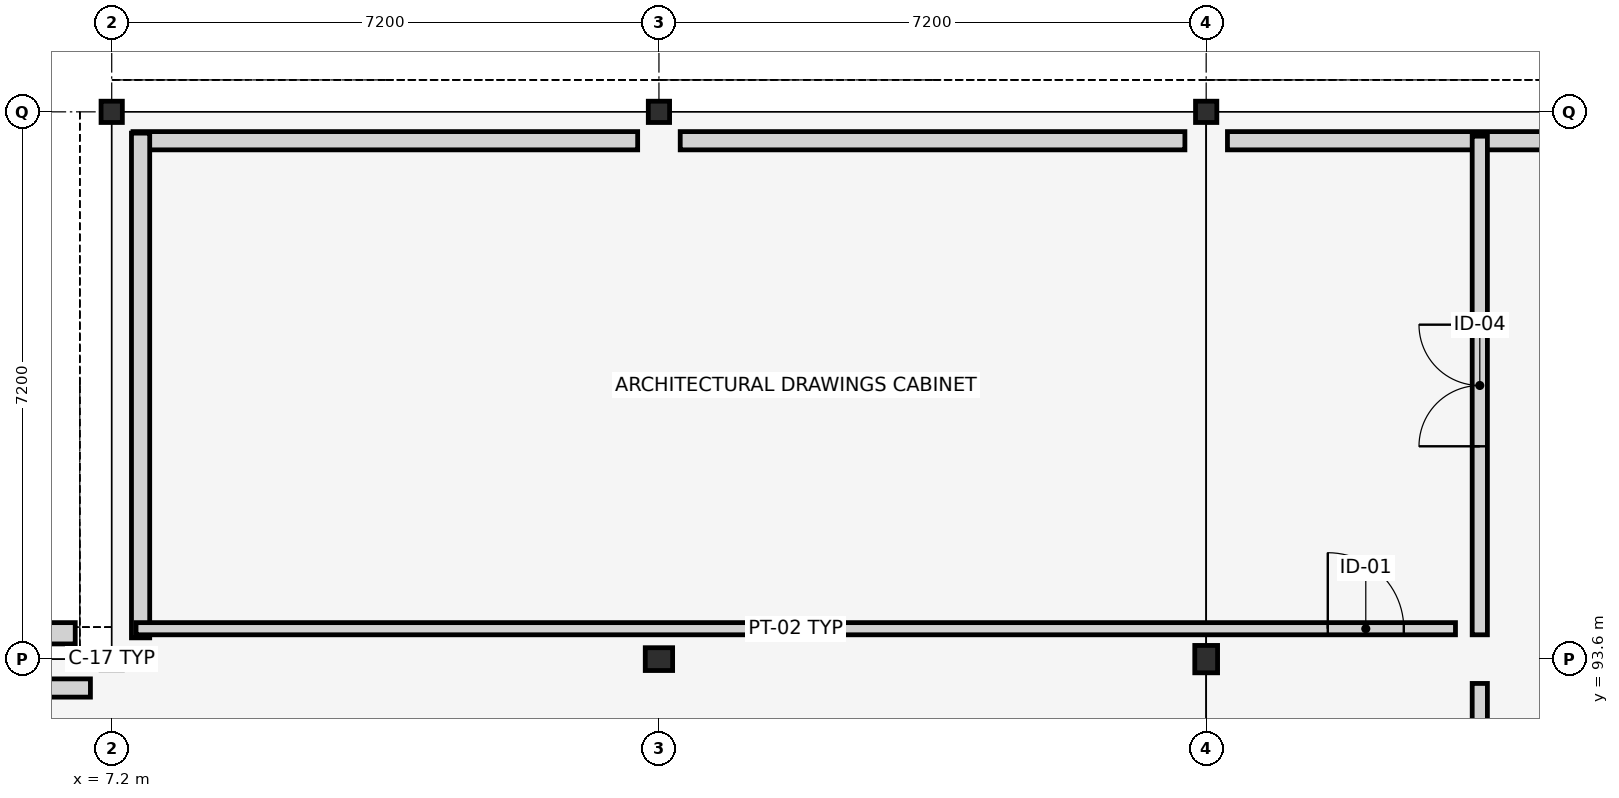
"""IFC4 building model, lengths in metres.
Left out: names, types, materials, properties, quantities, classifications, styles, units other than length and angle.
Written with IfcOpenShell. Run it as: python <this file> out.ifc"""

import sys

from ifc_helpers import new_model, si_unit, direction, frame, frame_2d, origin, origin_2d, place, context, subcontext, project, spatial, rectangle, i_section, extrude, element, fill, save


model = new_model("IFC4")
c1 = context("Model", 3, precision=1e-05, world=origin(), true_north=direction((0.0, 1.0)))
c2 = subcontext(c1, "Body", "Model", "MODEL_VIEW")
j1 = project(units=[si_unit("LENGTHUNIT", "METRE"), si_unit("PLANEANGLEUNIT", "RADIAN")], contexts=[c1])
p1 = place(None, origin())
s1 = spatial("IfcSite", under=j1, at=p1, CompositionType="ELEMENT")
p2 = place(p1, origin())
s2 = spatial("IfcBuilding", under=s1, at=p2, CompositionType="ELEMENT")
p3 = place(p2, frame((0.0, 0.0, 12.9)))
s3 = spatial("IfcBuildingStorey", under=s2, at=p3, CompositionType="ELEMENT", Elevation=12.9)
for number, where, z_axis, x_axis in (
    (1, (7.2, 93.6, 0.0), (0.0, 0.0, 1.0), (1.0, 0.0, 0.0)),
    (2, (7.2, 100.8, 0.0), (0.0, 0.0, 1.0), (0.0, 1.0, 0.0)),
):
    element("IfcColumn", number, at=place(p3, frame(where, z_axis=z_axis, x_axis=x_axis)), inside=s3, PredefinedType="COLUMN", context=c2, shape_type="SweptSolid", body=[
        extrude(i_section(OverallWidth=0.28, OverallDepth=0.28, WebThickness=0.01, FlangeThickness=0.018, FilletRadius=0.024, at=origin_2d()), origin(), (0.0, 0.0, 1.0), 4.2),
    ])
p4 = place(p3, frame((14.4, 93.6, 0.0), z_axis=(0.0, 0.0, 1.0), x_axis=(0.0, 1.0, 0.0)))
e3 = element("IfcColumn", 3, at=p4, inside=s3, PredefinedType="COLUMN", context=c2, shape_type="SweptSolid", body=[
    extrude(i_section(OverallWidth=0.3, OverallDepth=0.36, WebThickness=0.012, FlangeThickness=0.022, FilletRadius=0.027, at=origin_2d()), origin(), (0.0, 0.0, 1.0), 4.2),
])
p5 = place(p3, frame((14.4, 100.8, 0.0), z_axis=(0.0, 0.0, 1.0), x_axis=(1.0, 0.0, 0.0)))
e4 = element("IfcColumn", 4, at=p5, inside=s3, PredefinedType="COLUMN", context=c2, shape_type="SweptSolid", body=[
    extrude(i_section(OverallWidth=0.28, OverallDepth=0.28, WebThickness=0.01, FlangeThickness=0.018, FilletRadius=0.024, at=origin_2d()), origin(), (0.0, 0.0, 1.0), 4.2),
])
p6 = place(p3, frame((21.6, 93.6, 0.0), z_axis=(0.0, 0.0, 1.0), x_axis=(1.0, 0.0, 0.0)))
e5 = element("IfcColumn", 5, at=p6, inside=s3, PredefinedType="COLUMN", context=c2, shape_type="SweptSolid", body=[
    extrude(i_section(OverallWidth=0.3, OverallDepth=0.36, WebThickness=0.012, FlangeThickness=0.022, FilletRadius=0.027, at=origin_2d()), origin(), (0.0, 0.0, 1.0), 4.2),
])
p7 = place(p3, frame((21.6, 100.8, 0.0), z_axis=(0.0, 0.0, 1.0), x_axis=(0.0, 1.0, 0.0)))
e6 = element("IfcColumn", 6, at=p7, inside=s3, PredefinedType="COLUMN", context=c2, shape_type="SweptSolid", body=[
    extrude(i_section(OverallWidth=0.28, OverallDepth=0.28, WebThickness=0.01, FlangeThickness=0.018, FilletRadius=0.024, at=origin_2d()), origin(), (0.0, 0.0, 1.0), 4.2),
])
for number, where, z_axis, x_axis in (
    (7, (14.12, 100.42, 0.0), (0.0, 0.0, 1.0), (-1.0, 0.0, 0.0)),
    (8, (21.32, 100.42, 0.0), (0.0, 0.0, 1.0), (-1.0, 0.0, 0.0)),
    (9, (28.52, 100.42, 0.0), (0.0, 0.0, 1.0), (-1.0, 0.0, 0.0)),
    (10, (7.58, 100.52, 0.0), (0.0, 0.0, 1.0), (0.0, -1.0, 0.0)),
):
    element("IfcWall", number, at=place(p3, frame(where, z_axis=z_axis, x_axis=x_axis)), inside=s3, PredefinedType="STANDARD", context=c2, shape_type="SweptSolid", body=[
        extrude(rectangle(XDim=6.64, YDim=0.24, at=frame_2d((3.32, 0.0))), origin(), (0.0, 0.0, 1.0), 3.58),
    ])
p8 = place(p3, frame((6.72, 93.94, 0.0), z_axis=(0.0, 0.0, 1.0), x_axis=(-1.0, 0.0, 0.0)))
e11 = element("IfcWall", 11, at=p8, inside=s3, PredefinedType="STANDARD", context=c2, shape_type="SweptSolid", body=[
    extrude(rectangle(XDim=4.92, YDim=0.28, at=frame_2d((2.46, 0.0))), origin(), (0.0, 0.0, 1.0), 4.2),
])
p9 = place(p3, frame((6.92, 93.22, 0.0), z_axis=(0.0, 0.0, 1.0), x_axis=(-1.0, 0.0, 0.0)))
e12 = element("IfcWall", 12, at=p9, inside=s3, PredefinedType="STANDARD", context=c2, shape_type="SweptSolid", body=[
    extrude(rectangle(XDim=4.84, YDim=0.24, at=frame_2d((2.42, 0.0))), origin(), (0.0, 0.0, 1.0), 3.58),
])
p10 = place(p3, frame((25.2, 72.32, 0.0), z_axis=(0.0, 0.0, 1.0), x_axis=(0.0, 1.0, 0.0)))
e13 = element("IfcWall", 13, at=p10, inside=s3, PredefinedType="PARTITIONING", context=c2, shape_type="SweptSolid", body=[
    extrude(rectangle(XDim=20.96, YDim=0.2, at=frame_2d((10.48, 0.0))), origin(), (0.0, 0.0, 1.0), 3.15),
])
p11 = place(p10, frame((9.73, 0.0, 0.0)))
e14 = element("IfcOpeningElement", 14, at=p11, cuts=e13, PredefinedType="OPENING", context=c2, shape_type="SweptSolid", body=[
    extrude(rectangle(XDim=1.5, YDim=2.25, at=frame_2d((0.75, 1.125))), frame((0.0, 0.11, 0.0), z_axis=(0.0, -1.0, 0.0), x_axis=(1.0, 0.0, 0.0)), (0.0, 0.0, 1.0), 0.22),
])
p12 = place(p3, frame((25.2, 93.92, 0.0), z_axis=(0.0, 0.0, 1.0), x_axis=(0.0, 1.0, 0.0)))
e15 = element("IfcWall", 15, at=p12, inside=s3, PredefinedType="PARTITIONING", context=c2, shape_type="SweptSolid", body=[
    extrude(rectangle(XDim=6.56, YDim=0.2, at=frame_2d((3.28, 0.0))), origin(), (0.0, 0.0, 1.0), 3.15),
])
p13 = place(p12, frame((2.48, 0.0, 0.0)))
e16 = element("IfcOpeningElement", 16, at=p13, cuts=e15, PredefinedType="OPENING", context=c2, shape_type="SweptSolid", body=[
    extrude(rectangle(XDim=1.6, YDim=2.35, at=frame_2d((0.8, 1.175))), frame((0.0, 0.11, 0.0), z_axis=(0.0, -1.0, 0.0), x_axis=(1.0, 0.0, 0.0)), (0.0, 0.0, 1.0), 0.22),
])
p14 = place(p3, frame((7.52, 94.0, 0.0), z_axis=(0.0, 0.0, 1.0), x_axis=(1.0, 0.0, 0.0)))
e17 = element("IfcWall", 17, at=p14, inside=s3, PredefinedType="PARTITIONING", context=c2, shape_type="SweptSolid", body=[
    extrude(rectangle(XDim=17.36, YDim=0.16, at=frame_2d((8.68, 0.0))), origin(), (0.0, 0.0, 1.0), 3.15),
])
p15 = place(p14, frame((15.68, 0.0, 0.0)))
e18 = element("IfcOpeningElement", 18, at=p15, cuts=e17, PredefinedType="OPENING", context=c2, shape_type="SweptSolid", body=[
    extrude(rectangle(XDim=1.0, YDim=2.15, at=frame_2d((0.5, 1.075))), frame((0.0, 0.09, 0.0), z_axis=(0.0, -1.0, 0.0), x_axis=(1.0, 0.0, 0.0)), (0.0, 0.0, 1.0), 0.18),
])
p16 = place(p13, origin())
e19 = element("IfcDoor", 19, at=p16, inside=s3, OperationType="DOUBLE_DOOR_SINGLE_SWING", PredefinedType="DOOR", context=c2, shape_type="SweptSolid", body=[
    extrude(rectangle(XDim=1.6, YDim=2.35, at=frame_2d((0.8, 1.175))), frame((0.0, 0.025, 0.0), z_axis=(0.0, -1.0, 0.0), x_axis=(1.0, 0.0, 0.0)), (0.0, 0.0, 1.0), 0.05),
])
fill(e16, e19)
p17 = place(p15, origin())
e20 = element("IfcDoor", 20, at=p17, inside=s3, OperationType="SINGLE_SWING_LEFT", PredefinedType="DOOR", context=c2, shape_type="SweptSolid", body=[
    extrude(rectangle(XDim=1.0, YDim=2.15, at=frame_2d((0.5, 1.075))), frame((0.0, 0.025, 0.0), z_axis=(0.0, -1.0, 0.0), x_axis=(1.0, 0.0, 0.0)), (0.0, 0.0, 1.0), 0.05),
])
fill(e18, e20)
save(model, sys.argv[1])
